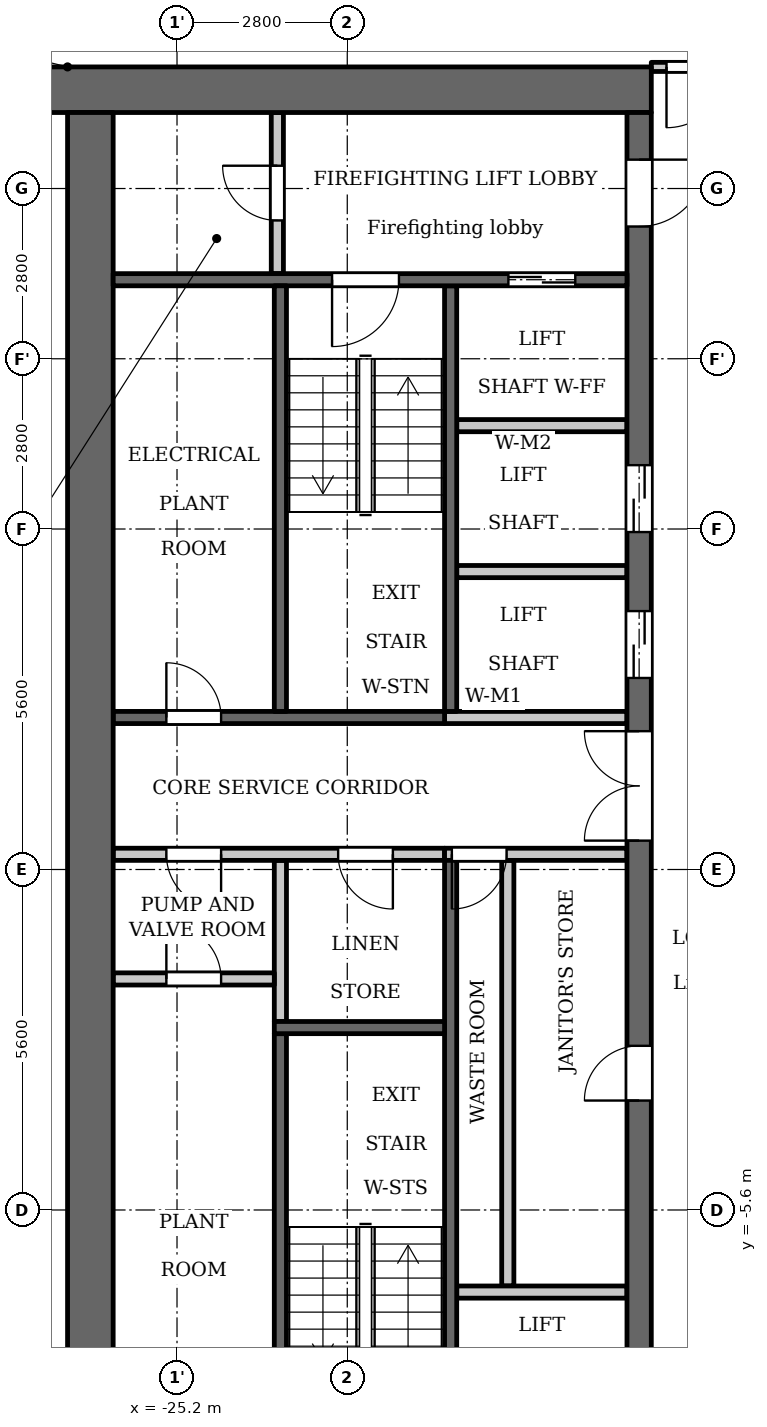
"""IFC4 building model, lengths in metres.
Left out: names, types, materials, properties, quantities, classifications, styles, units other than length and angle.
Written with IfcOpenShell. Run it as: python <this file> out.ifc"""

import sys

from ifc_helpers import new_model, si_unit, direction, frame, frame_2d, origin, place, context, subcontext, project, spatial, rectangle, extrude, element, fill, save


model = new_model("IFC4")
c1 = context("Model", 3, precision=1e-05, world=origin(), true_north=direction((0.0, 1.0)))
c2 = subcontext(c1, "Body", "Model", "MODEL_VIEW")
j1 = project(units=[si_unit("LENGTHUNIT", "METRE"), si_unit("PLANEANGLEUNIT", "RADIAN")], contexts=[c1])
p1 = place(None, origin())
s1 = spatial("IfcSite", under=j1, at=p1, CompositionType="ELEMENT")
p2 = place(p1, origin())
s2 = spatial("IfcBuilding", under=s1, at=p2, CompositionType="ELEMENT")
p3 = place(p2, frame((0.0, 0.0, 174.6)))
s3 = spatial("IfcBuildingStorey", under=s2, at=p3, CompositionType="ELEMENT", Elevation=174.6)
p4 = place(p3, frame((-23.5, -2.5, 0.0), z_axis=(0.0, 0.0, 1.0), x_axis=(0.0, 1.0, 0.0)))
e1 = element("IfcWall", 1, at=p4, inside=s3, PredefinedType="PARTITIONING", context=c2, shape_type="SweptSolid", body=[
    extrude(rectangle(XDim=2.65, YDim=0.2, at=frame_2d((1.325, 0.0))), origin(), (0.0, 0.0, 1.0), 3.15),
])
p5 = place(p3, frame((-20.7, 2.6, 0.0), z_axis=(0.0, 0.0, 1.0), x_axis=(0.0, 1.0, 0.0)))
e2 = element("IfcWall", 2, at=p5, inside=s3, PredefinedType="SHEAR", context=c2, shape_type="SweptSolid", body=[
    extrude(rectangle(XDim=7.0, YDim=0.2, at=frame_2d((3.5, 0.0))), origin(), (0.0, 0.0, 1.0), 3.15),
])
p6 = place(p3, frame((-20.7, -9.6, 0.0), z_axis=(0.0, 0.0, 1.0), x_axis=(0.0, 1.0, 0.0)))
e3 = element("IfcWall", 3, at=p6, inside=s3, PredefinedType="SHEAR", context=c2, shape_type="SweptSolid", body=[
    extrude(rectangle(XDim=9.75, YDim=0.2, at=frame_2d((4.875, 0.0))), origin(), (0.0, 0.0, 1.0), 3.15),
])
p7 = place(p3, frame((-20.8, 2.5, 0.0), z_axis=(0.0, 0.0, 1.0), x_axis=(-1.0, 0.0, 0.0)))
e4 = element("IfcWall", 4, at=p7, inside=s3, PredefinedType="SHEAR", context=c2, shape_type="SweptSolid", body=[
    extrude(rectangle(XDim=5.45, YDim=0.2, at=frame_2d((2.725, 0.0))), origin(), (0.0, 0.0, 1.0), 3.15),
])
p8 = place(p7, frame((3.675, 0.0, 0.0)))
e5 = element("IfcOpeningElement", 5, at=p8, cuts=e4, PredefinedType="OPENING", context=c2, shape_type="SweptSolid", body=[
    extrude(rectangle(XDim=0.9, YDim=2.1, at=frame_2d((0.45, 1.05))), frame((0.0, 0.11, 0.0), z_axis=(0.0, -1.0, 0.0), x_axis=(1.0, 0.0, 0.0)), (0.0, 0.0, 1.0), 0.22),
])
p9 = place(p3, frame((-20.8, 0.25, 0.0), z_axis=(0.0, 0.0, 1.0), x_axis=(-1.0, 0.0, 0.0)))
e6 = element("IfcWall", 6, at=p9, inside=s3, PredefinedType="PARTITIONING", context=c2, shape_type="SweptSolid", body=[
    extrude(rectangle(XDim=5.45, YDim=0.2, at=frame_2d((2.725, 0.0))), origin(), (0.0, 0.0, 1.0), 3.15),
])
p10 = place(p9, frame((0.85, 0.0, 0.0)))
e7 = element("IfcOpeningElement", 7, at=p10, cuts=e6, PredefinedType="OPENING", context=c2, shape_type="SweptSolid", body=[
    extrude(rectangle(XDim=0.9, YDim=2.1, at=frame_2d((0.45, 1.05))), frame((0.0, 0.11, 0.0), z_axis=(0.0, -1.0, 0.0), x_axis=(1.0, 0.0, 0.0)), (0.0, 0.0, 1.0), 0.22),
])
p11 = place(p9, frame((3.675, 0.0, 0.0)))
e8 = element("IfcOpeningElement", 8, at=p11, cuts=e6, PredefinedType="OPENING", context=c2, shape_type="SweptSolid", body=[
    extrude(rectangle(XDim=0.9, YDim=2.1, at=frame_2d((0.45, 1.05))), frame((0.0, 0.11, 0.0), z_axis=(0.0, -1.0, 0.0), x_axis=(1.0, 0.0, 0.0)), (0.0, 0.0, 1.0), 0.22),
])
p12 = place(p3, frame((-17.4, 12.825, 0.0), z_axis=(0.0, 0.0, 1.0), x_axis=(-1.0, 0.0, 0.0)))
e9 = element("IfcWall", 9, at=p12, inside=s3, PredefinedType="SHEAR", context=c2, shape_type="SweptSolid", body=[
    extrude(rectangle(XDim=10.4, YDim=0.75, at=frame_2d((5.2, 0.0))), origin(), (0.0, 0.0, 1.0), 3.15),
])
p13 = place(p3, frame((-19.76, -6.85, 0.0), z_axis=(0.0, 0.0, 1.0), x_axis=(0.0, 1.0, 0.0)))
e10 = element("IfcWall", 10, at=p13, inside=s3, PredefinedType="PARTITIONING", context=c2, shape_type="SweptSolid", body=[
    extrude(rectangle(XDim=7.0, YDim=0.2, at=frame_2d((3.5, 0.0))), origin(), (0.0, 0.0, 1.0), 3.15),
])
p14 = place(p3, frame((-17.6, -12.45, 0.0), z_axis=(0.0, 0.0, 1.0), x_axis=(0.0, 1.0, 0.0)))
e11 = element("IfcWall", 11, at=p14, inside=s3, PredefinedType="SHEAR", context=c2, shape_type="SweptSolid", body=[
    extrude(rectangle(XDim=24.9, YDim=0.4, at=frame_2d((12.45, 0.0))), origin(), (0.0, 0.0, 1.0), 3.15),
])
p15 = place(p14, frame((8.65, 0.0, 0.0)))
e12 = element("IfcOpeningElement", 12, at=p15, cuts=e11, PredefinedType="OPENING", context=c2, shape_type="SweptSolid", body=[
    extrude(rectangle(XDim=0.9, YDim=2.1, at=frame_2d((0.45, 1.05))), frame((0.0, 0.21, 0.0), z_axis=(0.0, -1.0, 0.0), x_axis=(1.0, 0.0, 0.0)), (0.0, 0.0, 1.0), 0.42),
])
p16 = place(p14, frame((15.6, 0.0, 0.0)))
e13 = element("IfcOpeningElement", 13, at=p16, cuts=e11, PredefinedType="OPENING", context=c2, shape_type="SweptSolid", body=[
    extrude(rectangle(XDim=1.1, YDim=2.1, at=frame_2d((0.55, 1.05))), frame((0.0, 0.21, 0.0), z_axis=(0.0, -1.0, 0.0), x_axis=(1.0, 0.0, 0.0)), (0.0, 0.0, 1.0), 0.42),
])
p17 = place(p14, frame((18.0, 0.0, 0.0)))
e14 = element("IfcOpeningElement", 14, at=p17, cuts=e11, PredefinedType="OPENING", context=c2, shape_type="SweptSolid", body=[
    extrude(rectangle(XDim=1.1, YDim=2.1, at=frame_2d((0.55, 1.05))), frame((0.0, 0.21, 0.0), z_axis=(0.0, -1.0, 0.0), x_axis=(1.0, 0.0, 0.0)), (0.0, 0.0, 1.0), 0.42),
])
p18 = place(p14, frame((23.025, 0.0, 0.0)))
e15 = element("IfcOpeningElement", 15, at=p18, cuts=e11, PredefinedType="OPENING", context=c2, shape_type="SweptSolid", body=[
    extrude(rectangle(XDim=1.1, YDim=2.1, at=frame_2d((0.55, 1.05))), frame((0.0, 0.21, 0.0), z_axis=(0.0, -1.0, 0.0), x_axis=(1.0, 0.0, 0.0)), (0.0, 0.0, 1.0), 0.42),
])
p19 = place(p14, frame((0.775, 0.0, 0.0)))
e16 = element("IfcOpeningElement", 16, at=p19, cuts=e11, PredefinedType="OPENING", context=c2, shape_type="SweptSolid", body=[
    extrude(rectangle(XDim=1.1, YDim=2.1, at=frame_2d((0.55, 1.05))), frame((0.0, 0.21, 0.0), z_axis=(0.0, -1.0, 0.0), x_axis=(1.0, 0.0, 0.0)), (0.0, 0.0, 1.0), 0.42),
])
p20 = place(p14, frame((12.925, 0.0, 0.0)))
e17 = element("IfcOpeningElement", 17, at=p20, cuts=e11, PredefinedType="OPENING", context=c2, shape_type="SweptSolid", body=[
    extrude(rectangle(XDim=1.8, YDim=2.1, at=frame_2d((0.9, 1.05))), frame((0.0, 0.21, 0.0), z_axis=(0.0, -1.0, 0.0), x_axis=(1.0, 0.0, 0.0)), (0.0, 0.0, 1.0), 0.42),
])
p21 = place(p3, frame((-26.625, -12.45, 0.0), z_axis=(0.0, 0.0, 1.0), x_axis=(0.0, 1.0, 0.0)))
e18 = element("IfcWall", 18, at=p21, inside=s3, PredefinedType="SHEAR", context=c2, shape_type="SweptSolid", body=[
    extrude(rectangle(XDim=24.9, YDim=0.75, at=frame_2d((12.45, 0.0))), origin(), (0.0, 0.0, 1.0), 3.15),
])
p22 = place(p3, frame((-23.55, 9.8, 0.0), z_axis=(0.0, 0.0, 1.0), x_axis=(0.0, 1.0, 0.0)))
e19 = element("IfcWall", 19, at=p22, inside=s3, PredefinedType="PARTITIONING", context=c2, shape_type="SweptSolid", body=[
    extrude(rectangle(XDim=2.65, YDim=0.2, at=frame_2d((1.325, 0.0))), origin(), (0.0, 0.0, 1.0), 3.15),
])
p23 = place(p22, frame((0.875, 0.0, 0.0)))
e20 = element("IfcOpeningElement", 20, at=p23, cuts=e19, PredefinedType="OPENING", context=c2, shape_type="SweptSolid", body=[
    extrude(rectangle(XDim=0.9, YDim=2.1, at=frame_2d((0.45, 1.05))), frame((0.0, 0.11, 0.0), z_axis=(0.0, -1.0, 0.0), x_axis=(1.0, 0.0, 0.0)), (0.0, 0.0, 1.0), 0.22),
])
p24 = place(p3, frame((-23.6, -1.8, 0.0), z_axis=(0.0, 0.0, 1.0), x_axis=(-1.0, 0.0, 0.0)))
e21 = element("IfcWall", 21, at=p24, inside=s3, PredefinedType="PARTITIONING", context=c2, shape_type="SweptSolid", body=[
    extrude(rectangle(XDim=2.65, YDim=0.2, at=frame_2d((1.325, 0.0))), origin(), (0.0, 0.0, 1.0), 3.15),
])
p25 = place(p24, frame((0.875, 0.0, 0.0)))
e22 = element("IfcOpeningElement", 22, at=p25, cuts=e21, PredefinedType="OPENING", context=c2, shape_type="SweptSolid", body=[
    extrude(rectangle(XDim=0.9, YDim=2.1, at=frame_2d((0.45, 1.05))), frame((0.0, 0.11, 0.0), z_axis=(0.0, -1.0, 0.0), x_axis=(1.0, 0.0, 0.0)), (0.0, 0.0, 1.0), 0.22),
])
p26 = place(p3, frame((-17.8, -6.95, 0.0), z_axis=(0.0, 0.0, 1.0), x_axis=(-1.0, 0.0, 0.0)))
e23 = element("IfcWall", 23, at=p26, inside=s3, PredefinedType="PARTITIONING", context=c2, shape_type="SweptSolid", body=[
    extrude(rectangle(XDim=2.8, YDim=0.2, at=frame_2d((1.4, 0.0))), origin(), (0.0, 0.0, 1.0), 3.15),
])
p27 = place(p3, frame((-17.8, 0.25, 0.0), z_axis=(0.0, 0.0, 1.0), x_axis=(-1.0, 0.0, 0.0)))
e24 = element("IfcWall", 24, at=p27, inside=s3, PredefinedType="PARTITIONING", context=c2, shape_type="SweptSolid", body=[
    extrude(rectangle(XDim=3.0, YDim=0.2, at=frame_2d((1.5, 0.0))), origin(), (0.0, 0.0, 1.0), 3.15),
])
p28 = place(p27, frame((1.98, 0.0, 0.0)))
e25 = element("IfcOpeningElement", 25, at=p28, cuts=e24, PredefinedType="OPENING", context=c2, shape_type="SweptSolid", body=[
    extrude(rectangle(XDim=0.9, YDim=2.1, at=frame_2d((0.45, 1.05))), frame((0.0, 0.11, 0.0), z_axis=(0.0, -1.0, 0.0), x_axis=(1.0, 0.0, 0.0)), (0.0, 0.0, 1.0), 0.22),
])
p29 = place(p3, frame((-17.8, 2.5, 0.0), z_axis=(0.0, 0.0, 1.0), x_axis=(-1.0, 0.0, 0.0)))
e26 = element("IfcWall", 26, at=p29, inside=s3, PredefinedType="PARTITIONING", context=c2, shape_type="SweptSolid", body=[
    extrude(rectangle(XDim=3.0, YDim=0.2, at=frame_2d((1.5, 0.0))), origin(), (0.0, 0.0, 1.0), 3.15),
])
for number, where, z_axis, x_axis in (
    (27, (-17.8, 4.9, 0.0), (0.0, 0.0, 1.0), (-1.0, 0.0, 0.0)),
    (28, (-17.8, 7.3, 0.0), (0.0, 0.0, 1.0), (-1.0, 0.0, 0.0)),
):
    element("IfcWall", number, at=place(p3, frame(where, z_axis=z_axis, x_axis=x_axis)), inside=s3, PredefinedType="PARTITIONING", context=c2, shape_type="SweptSolid", body=[
        extrude(rectangle(XDim=2.8, YDim=0.2, at=frame_2d((1.4, 0.0))), origin(), (0.0, 0.0, 1.0), 3.15),
    ])
p30 = place(p3, frame((-17.8, 9.7, 0.0), z_axis=(0.0, 0.0, 1.0), x_axis=(-1.0, 0.0, 0.0)))
e29 = element("IfcWall", 29, at=p30, inside=s3, PredefinedType="SHEAR", context=c2, shape_type="SweptSolid", body=[
    extrude(rectangle(XDim=8.45, YDim=0.2, at=frame_2d((4.225, 0.0))), origin(), (0.0, 0.0, 1.0), 3.15),
])
p31 = place(p30, frame((0.85, 0.0, 0.0)))
e30 = element("IfcOpeningElement", 30, at=p31, cuts=e29, PredefinedType="OPENING", context=c2, shape_type="SweptSolid", body=[
    extrude(rectangle(XDim=1.1, YDim=2.1, at=frame_2d((0.55, 1.05))), frame((0.0, 0.11, 0.0), z_axis=(0.0, -1.0, 0.0), x_axis=(1.0, 0.0, 0.0)), (0.0, 0.0, 1.0), 0.22),
])
p32 = place(p30, frame((3.75, 0.0, 0.0)))
e31 = element("IfcOpeningElement", 31, at=p32, cuts=e29, PredefinedType="OPENING", context=c2, shape_type="SweptSolid", body=[
    extrude(rectangle(XDim=1.1, YDim=2.1, at=frame_2d((0.55, 1.05))), frame((0.0, 0.11, 0.0), z_axis=(0.0, -1.0, 0.0), x_axis=(1.0, 0.0, 0.0)), (0.0, 0.0, 1.0), 0.22),
])
p33 = place(p3, frame((-23.5, 2.6, 0.0), z_axis=(0.0, 0.0, 1.0), x_axis=(0.0, 1.0, 0.0)))
e32 = element("IfcWall", 32, at=p33, inside=s3, PredefinedType="SHEAR", context=c2, shape_type="SweptSolid", body=[
    extrude(rectangle(XDim=7.0, YDim=0.2, at=frame_2d((3.5, 0.0))), origin(), (0.0, 0.0, 1.0), 3.15),
])
p34 = place(p3, frame((-23.5, -9.6, 0.0), z_axis=(0.0, 0.0, 1.0), x_axis=(0.0, 1.0, 0.0)))
e33 = element("IfcWall", 33, at=p34, inside=s3, PredefinedType="SHEAR", context=c2, shape_type="SweptSolid", body=[
    extrude(rectangle(XDim=6.9, YDim=0.2, at=frame_2d((3.45, 0.0))), origin(), (0.0, 0.0, 1.0), 3.15),
])
p35 = place(p3, frame((-20.8, -2.6, 0.0), z_axis=(0.0, 0.0, 1.0), x_axis=(-1.0, 0.0, 0.0)))
e34 = element("IfcWall", 34, at=p35, inside=s3, PredefinedType="SHEAR", context=c2, shape_type="SweptSolid", body=[
    extrude(rectangle(XDim=2.8, YDim=0.2, at=frame_2d((1.4, 0.0))), origin(), (0.0, 0.0, 1.0), 3.15),
])
p36 = place(p3, frame((-17.4, 13.2, 0.0), z_axis=(0.0, 0.0, 1.0), x_axis=(1.0, 0.0, 0.0)))
e35 = element("IfcWall", 35, at=p36, inside=s3, PredefinedType="PARTITIONING", context=c2, shape_type="SweptSolid", body=[
    extrude(rectangle(XDim=34.8, YDim=0.15, at=frame_2d((17.4, 0.0))), origin(), (0.0, 0.0, 1.0), 3.15),
])
p37 = place(p36, frame((0.25, 0.0, 0.0)))
e36 = element("IfcOpeningElement", 36, at=p37, cuts=e35, PredefinedType="OPENING", context=c2, shape_type="SweptSolid", body=[
    extrude(rectangle(XDim=1.0, YDim=2.1, at=frame_2d((0.5, 1.05))), frame((0.0, 0.085, 0.0), z_axis=(0.0, -1.0, 0.0), x_axis=(1.0, 0.0, 0.0)), (0.0, 0.0, 1.0), 0.17),
])
p38 = place(p36, frame((33.65, 0.0, 0.0)))
e37 = element("IfcOpeningElement", 37, at=p38, cuts=e35, PredefinedType="OPENING", context=c2, shape_type="SweptSolid", body=[
    extrude(rectangle(XDim=1.0, YDim=2.1, at=frame_2d((0.5, 1.05))), frame((0.0, 0.085, 0.0), z_axis=(0.0, -1.0, 0.0), x_axis=(1.0, 0.0, 0.0)), (0.0, 0.0, 1.0), 0.17),
])
p39 = place(p36, frame((10.15, 0.0, 0.0)))
e38 = element("IfcOpeningElement", 38, at=p39, cuts=e35, PredefinedType="OPENING", context=c2, shape_type="SweptSolid", body=[
    extrude(rectangle(XDim=1.0, YDim=2.1, at=frame_2d((0.5, 1.05))), frame((0.0, 0.085, 0.0), z_axis=(0.0, -1.0, 0.0), x_axis=(1.0, 0.0, 0.0)), (0.0, 0.0, 1.0), 0.17),
])
p40 = place(p36, frame((15.75, 0.0, 0.0)))
e39 = element("IfcOpeningElement", 39, at=p40, cuts=e35, PredefinedType="OPENING", context=c2, shape_type="SweptSolid", body=[
    extrude(rectangle(XDim=1.0, YDim=2.1, at=frame_2d((0.5, 1.05))), frame((0.0, 0.085, 0.0), z_axis=(0.0, -1.0, 0.0), x_axis=(1.0, 0.0, 0.0)), (0.0, 0.0, 1.0), 0.17),
])
p41 = place(p36, frame((24.95, 0.0, 0.0)))
e40 = element("IfcOpeningElement", 40, at=p41, cuts=e35, PredefinedType="OPENING", context=c2, shape_type="SweptSolid", body=[
    extrude(rectangle(XDim=1.0, YDim=2.1, at=frame_2d((0.5, 1.05))), frame((0.0, 0.085, 0.0), z_axis=(0.0, -1.0, 0.0), x_axis=(1.0, 0.0, 0.0)), (0.0, 0.0, 1.0), 0.17),
])
p42 = place(p36, frame((29.95, 0.0, 0.0)))
e41 = element("IfcOpeningElement", 41, at=p42, cuts=e35, PredefinedType="OPENING", context=c2, shape_type="SweptSolid", body=[
    extrude(rectangle(XDim=1.0, YDim=2.1, at=frame_2d((0.5, 1.05))), frame((0.0, 0.085, 0.0), z_axis=(0.0, -1.0, 0.0), x_axis=(1.0, 0.0, 0.0)), (0.0, 0.0, 1.0), 0.17),
])
p43 = place(p15, origin())
e42 = element("IfcDoor", 42, at=p43, inside=s3, OperationType="SINGLE_SWING_RIGHT", PredefinedType="DOOR", context=c2, shape_type="SweptSolid", body=[
    extrude(rectangle(XDim=0.9, YDim=2.1, at=frame_2d((0.45, 1.05))), frame((0.0, 0.025, 0.0), z_axis=(0.0, -1.0, 0.0), x_axis=(1.0, 0.0, 0.0)), (0.0, 0.0, 1.0), 0.05),
])
fill(e12, e42)
p44 = place(p28, origin())
e43 = element("IfcDoor", 43, at=p44, inside=s3, OperationType="SINGLE_SWING_LEFT", PredefinedType="DOOR", context=c2, shape_type="SweptSolid", body=[
    extrude(rectangle(XDim=0.9, YDim=2.1, at=frame_2d((0.45, 1.05))), frame((0.0, 0.025, 0.0), z_axis=(0.0, -1.0, 0.0), x_axis=(1.0, 0.0, 0.0)), (0.0, 0.0, 1.0), 0.05),
])
fill(e25, e43)
p45 = place(p16, origin())
e44 = element("IfcDoor", 44, at=p45, inside=s3, OperationType="DOUBLE_DOOR_SLIDING", PredefinedType="DOOR", context=c2, shape_type="SweptSolid", body=[
    extrude(rectangle(XDim=1.1, YDim=2.1, at=frame_2d((0.55, 1.05))), frame((0.0, 0.025, 0.0), z_axis=(0.0, -1.0, 0.0), x_axis=(1.0, 0.0, 0.0)), (0.0, 0.0, 1.0), 0.05),
])
fill(e13, e44)
p46 = place(p17, origin())
e45 = element("IfcDoor", 45, at=p46, inside=s3, OperationType="DOUBLE_DOOR_SLIDING", PredefinedType="DOOR", context=c2, shape_type="SweptSolid", body=[
    extrude(rectangle(XDim=1.1, YDim=2.1, at=frame_2d((0.55, 1.05))), frame((0.0, 0.025, 0.0), z_axis=(0.0, -1.0, 0.0), x_axis=(1.0, 0.0, 0.0)), (0.0, 0.0, 1.0), 0.05),
])
fill(e14, e45)
p47 = place(p31, origin())
e46 = element("IfcDoor", 46, at=p47, inside=s3, OperationType="DOUBLE_DOOR_SLIDING", PredefinedType="DOOR", context=c2, shape_type="SweptSolid", body=[
    extrude(rectangle(XDim=1.1, YDim=2.1, at=frame_2d((0.55, 1.05))), frame((0.0, 0.025, 0.0), z_axis=(0.0, -1.0, 0.0), x_axis=(1.0, 0.0, 0.0)), (0.0, 0.0, 1.0), 0.05),
])
fill(e30, e46)
p48 = place(p18, origin())
e47 = element("IfcDoor", 47, at=p48, inside=s3, OperationType="SINGLE_SWING_RIGHT", PredefinedType="DOOR", context=c2, shape_type="SweptSolid", body=[
    extrude(rectangle(XDim=1.1, YDim=2.1, at=frame_2d((0.55, 1.05))), frame((0.0, 0.025, 0.0), z_axis=(0.0, -1.0, 0.0), x_axis=(1.0, 0.0, 0.0)), (0.0, 0.0, 1.0), 0.05),
])
fill(e15, e47)
p49 = place(p23, origin())
e48 = element("IfcDoor", 48, at=p49, inside=s3, OperationType="SINGLE_SWING_LEFT", PredefinedType="DOOR", context=c2, shape_type="SweptSolid", body=[
    extrude(rectangle(XDim=0.9, YDim=2.1, at=frame_2d((0.45, 1.05))), frame((0.0, 0.025, 0.0), z_axis=(0.0, -1.0, 0.0), x_axis=(1.0, 0.0, 0.0)), (0.0, 0.0, 1.0), 0.05),
])
fill(e20, e48)
p50 = place(p32, origin())
e49 = element("IfcDoor", 49, at=p50, inside=s3, OperationType="SINGLE_SWING_LEFT", PredefinedType="DOOR", context=c2, shape_type="SweptSolid", body=[
    extrude(rectangle(XDim=1.1, YDim=2.1, at=frame_2d((0.55, 1.05))), frame((0.0, 0.025, 0.0), z_axis=(0.0, -1.0, 0.0), x_axis=(1.0, 0.0, 0.0)), (0.0, 0.0, 1.0), 0.05),
])
fill(e31, e49)
p51 = place(p20, origin())
e50 = element("IfcDoor", 50, at=p51, inside=s3, OperationType="DOUBLE_DOOR_SINGLE_SWING", PredefinedType="DOOR", context=c2, shape_type="SweptSolid", body=[
    extrude(rectangle(XDim=1.8, YDim=2.1, at=frame_2d((0.9, 1.05))), frame((0.0, 0.025, 0.0), z_axis=(0.0, -1.0, 0.0), x_axis=(1.0, 0.0, 0.0)), (0.0, 0.0, 1.0), 0.05),
])
fill(e17, e50)
p52 = place(p10, origin())
e51 = element("IfcDoor", 51, at=p52, inside=s3, OperationType="SINGLE_SWING_RIGHT", PredefinedType="DOOR", context=c2, shape_type="SweptSolid", body=[
    extrude(rectangle(XDim=0.9, YDim=2.1, at=frame_2d((0.45, 1.05))), frame((0.0, 0.025, 0.0), z_axis=(0.0, -1.0, 0.0), x_axis=(1.0, 0.0, 0.0)), (0.0, 0.0, 1.0), 0.05),
])
fill(e7, e51)
p53 = place(p25, origin())
e52 = element("IfcDoor", 52, at=p53, inside=s3, OperationType="SINGLE_SWING_RIGHT", PredefinedType="DOOR", context=c2, shape_type="SweptSolid", body=[
    extrude(rectangle(XDim=0.9, YDim=2.1, at=frame_2d((0.45, 1.05))), frame((0.0, 0.025, 0.0), z_axis=(0.0, -1.0, 0.0), x_axis=(1.0, 0.0, 0.0)), (0.0, 0.0, 1.0), 0.05),
])
fill(e22, e52)
p54 = place(p11, origin())
e53 = element("IfcDoor", 53, at=p54, inside=s3, OperationType="SINGLE_SWING_RIGHT", PredefinedType="DOOR", context=c2, shape_type="SweptSolid", body=[
    extrude(rectangle(XDim=0.9, YDim=2.1, at=frame_2d((0.45, 1.05))), frame((0.0, 0.025, 0.0), z_axis=(0.0, -1.0, 0.0), x_axis=(1.0, 0.0, 0.0)), (0.0, 0.0, 1.0), 0.05),
])
fill(e8, e53)
p55 = place(p8, origin())
e54 = element("IfcDoor", 54, at=p55, inside=s3, OperationType="SINGLE_SWING_RIGHT", PredefinedType="DOOR", context=c2, shape_type="SweptSolid", body=[
    extrude(rectangle(XDim=0.9, YDim=2.1, at=frame_2d((0.45, 1.05))), frame((0.0, 0.025, 0.0), z_axis=(0.0, -1.0, 0.0), x_axis=(1.0, 0.0, 0.0)), (0.0, 0.0, 1.0), 0.05),
])
fill(e5, e54)
p56 = place(p37, origin())
e55 = element("IfcDoor", 55, at=p56, inside=s3, OperationType="SINGLE_SWING_LEFT", PredefinedType="DOOR", context=c2, shape_type="SweptSolid", body=[
    extrude(rectangle(XDim=1.0, YDim=2.1, at=frame_2d((0.5, 1.05))), frame((0.0, 0.025, 0.0), z_axis=(0.0, -1.0, 0.0), x_axis=(1.0, 0.0, 0.0)), (0.0, 0.0, 1.0), 0.05),
])
fill(e36, e55)
save(model, sys.argv[1])
